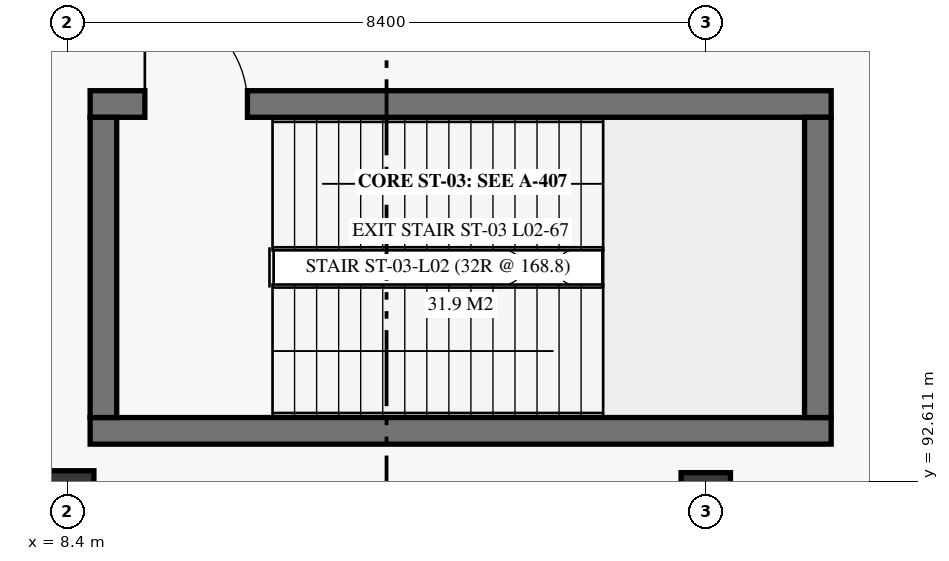
"""IFC4 building model, lengths in metres.
Left out: names, types, materials, properties, quantities, classifications, styles, units other than length and angle.
Written with IfcOpenShell. Run it as: python <this file> out.ifc"""

import sys

from ifc_helpers import new_model, si_unit, direction, frame, frame_2d, origin, origin_2d, place, context, subcontext, project, spatial, rectangle, extrude, element, fill, save


model = new_model("IFC4")
c1 = context("Model", 3, precision=1e-05, world=origin(), true_north=direction((0.0, 1.0)))
c2 = subcontext(c1, "Body", "Model", "MODEL_VIEW")
j1 = project(units=[si_unit("LENGTHUNIT", "METRE"), si_unit("PLANEANGLEUNIT", "RADIAN")], contexts=[c1])
p1 = place(None, origin())
s1 = spatial("IfcSite", under=j1, at=p1, CompositionType="ELEMENT")
p2 = place(p1, origin())
s2 = spatial("IfcBuilding", under=s1, at=p2, CompositionType="ELEMENT")
p3 = place(p2, frame((0.0, 0.0, 6.0)))
s3 = spatial("IfcBuildingStorey", under=s2, at=p3, CompositionType="ELEMENT", Elevation=6.0)
p4 = place(p3, frame((8.4, 92.4, 0.0), z_axis=(0.0, 0.0, 1.0), x_axis=(1.0, 0.0, 0.0)))
e1 = element("IfcColumn", 1, at=p4, inside=s3, PredefinedType="COLUMN", context=c2, shape_type="SweptSolid", body=[
    extrude(rectangle(XDim=0.7, YDim=0.7, at=origin_2d()), origin(), (0.0, 0.0, 1.0), 5.1),
])
p5 = place(p3, frame((16.8, 92.4, 0.0), z_axis=(0.0, 0.0, 1.0), x_axis=(1.0, 0.0, 0.0)))
e2 = element("IfcColumn", 2, at=p5, inside=s3, PredefinedType="COLUMN", context=c2, shape_type="SweptSolid", body=[
    extrude(rectangle(XDim=0.65, YDim=0.65, at=origin_2d()), origin(), (0.0, 0.0, 1.0), 5.1),
])
p6 = place(p3, frame((8.7, 93.275, 0.0), z_axis=(0.0, 0.0, 1.0), x_axis=(1.0, 0.0, 0.0)))
e3 = element("IfcWall", 3, at=p6, inside=s3, PredefinedType="SHEAR", context=c2, shape_type="SweptSolid", body=[
    extrude(rectangle(XDim=9.75, YDim=0.35, at=frame_2d((4.875, 0.0))), origin(), (0.0, 0.0, 1.0), 5.1),
])
p7 = place(p3, frame((8.7, 97.575, 0.0), z_axis=(0.0, 0.0, 1.0), x_axis=(1.0, 0.0, 0.0)))
e4 = element("IfcWall", 4, at=p7, inside=s3, PredefinedType="SHEAR", context=c2, shape_type="SweptSolid", body=[
    extrude(rectangle(XDim=9.75, YDim=0.35, at=frame_2d((4.875, 0.0))), origin(), (0.0, 0.0, 1.0), 5.1),
])
p8 = place(p7, frame((0.72, 0.0, 0.0)))
e5 = element("IfcOpeningElement", 5, at=p8, cuts=e4, PredefinedType="OPENING", context=c2, shape_type="SweptSolid", body=[
    extrude(rectangle(XDim=1.35, YDim=2.25, at=frame_2d((0.675, 1.125))), frame((0.0, 0.185, 0.0), z_axis=(0.0, -1.0, 0.0), x_axis=(1.0, 0.0, 0.0)), (0.0, 0.0, 1.0), 0.37),
])
for number, where, z_axis, x_axis in (
    (6, (8.875, 93.45, 0.0), (0.0, 0.0, 1.0), (0.0, 1.0, 0.0)),
    (7, (18.275, 93.45, 0.0), (0.0, 0.0, 1.0), (0.0, 1.0, 0.0)),
):
    element("IfcWall", number, at=place(p3, frame(where, z_axis=z_axis, x_axis=x_axis)), inside=s3, PredefinedType="SHEAR", context=c2, shape_type="SweptSolid", body=[
        extrude(rectangle(XDim=3.95, YDim=0.35, at=frame_2d((1.975, 0.0))), origin(), (0.0, 0.0, 1.0), 5.1),
    ])
p9 = place(p8, origin())
e8 = element("IfcDoor", 8, at=p9, inside=s3, OperationType="SINGLE_SWING_LEFT", PredefinedType="DOOR", context=c2, shape_type="SweptSolid", body=[
    extrude(rectangle(XDim=1.35, YDim=2.25, at=frame_2d((0.675, 1.125))), frame((0.0, 0.025, 0.0), z_axis=(0.0, -1.0, 0.0), x_axis=(1.0, 0.0, 0.0)), (0.0, 0.0, 1.0), 0.05),
])
fill(e5, e8)
save(model, sys.argv[1])
